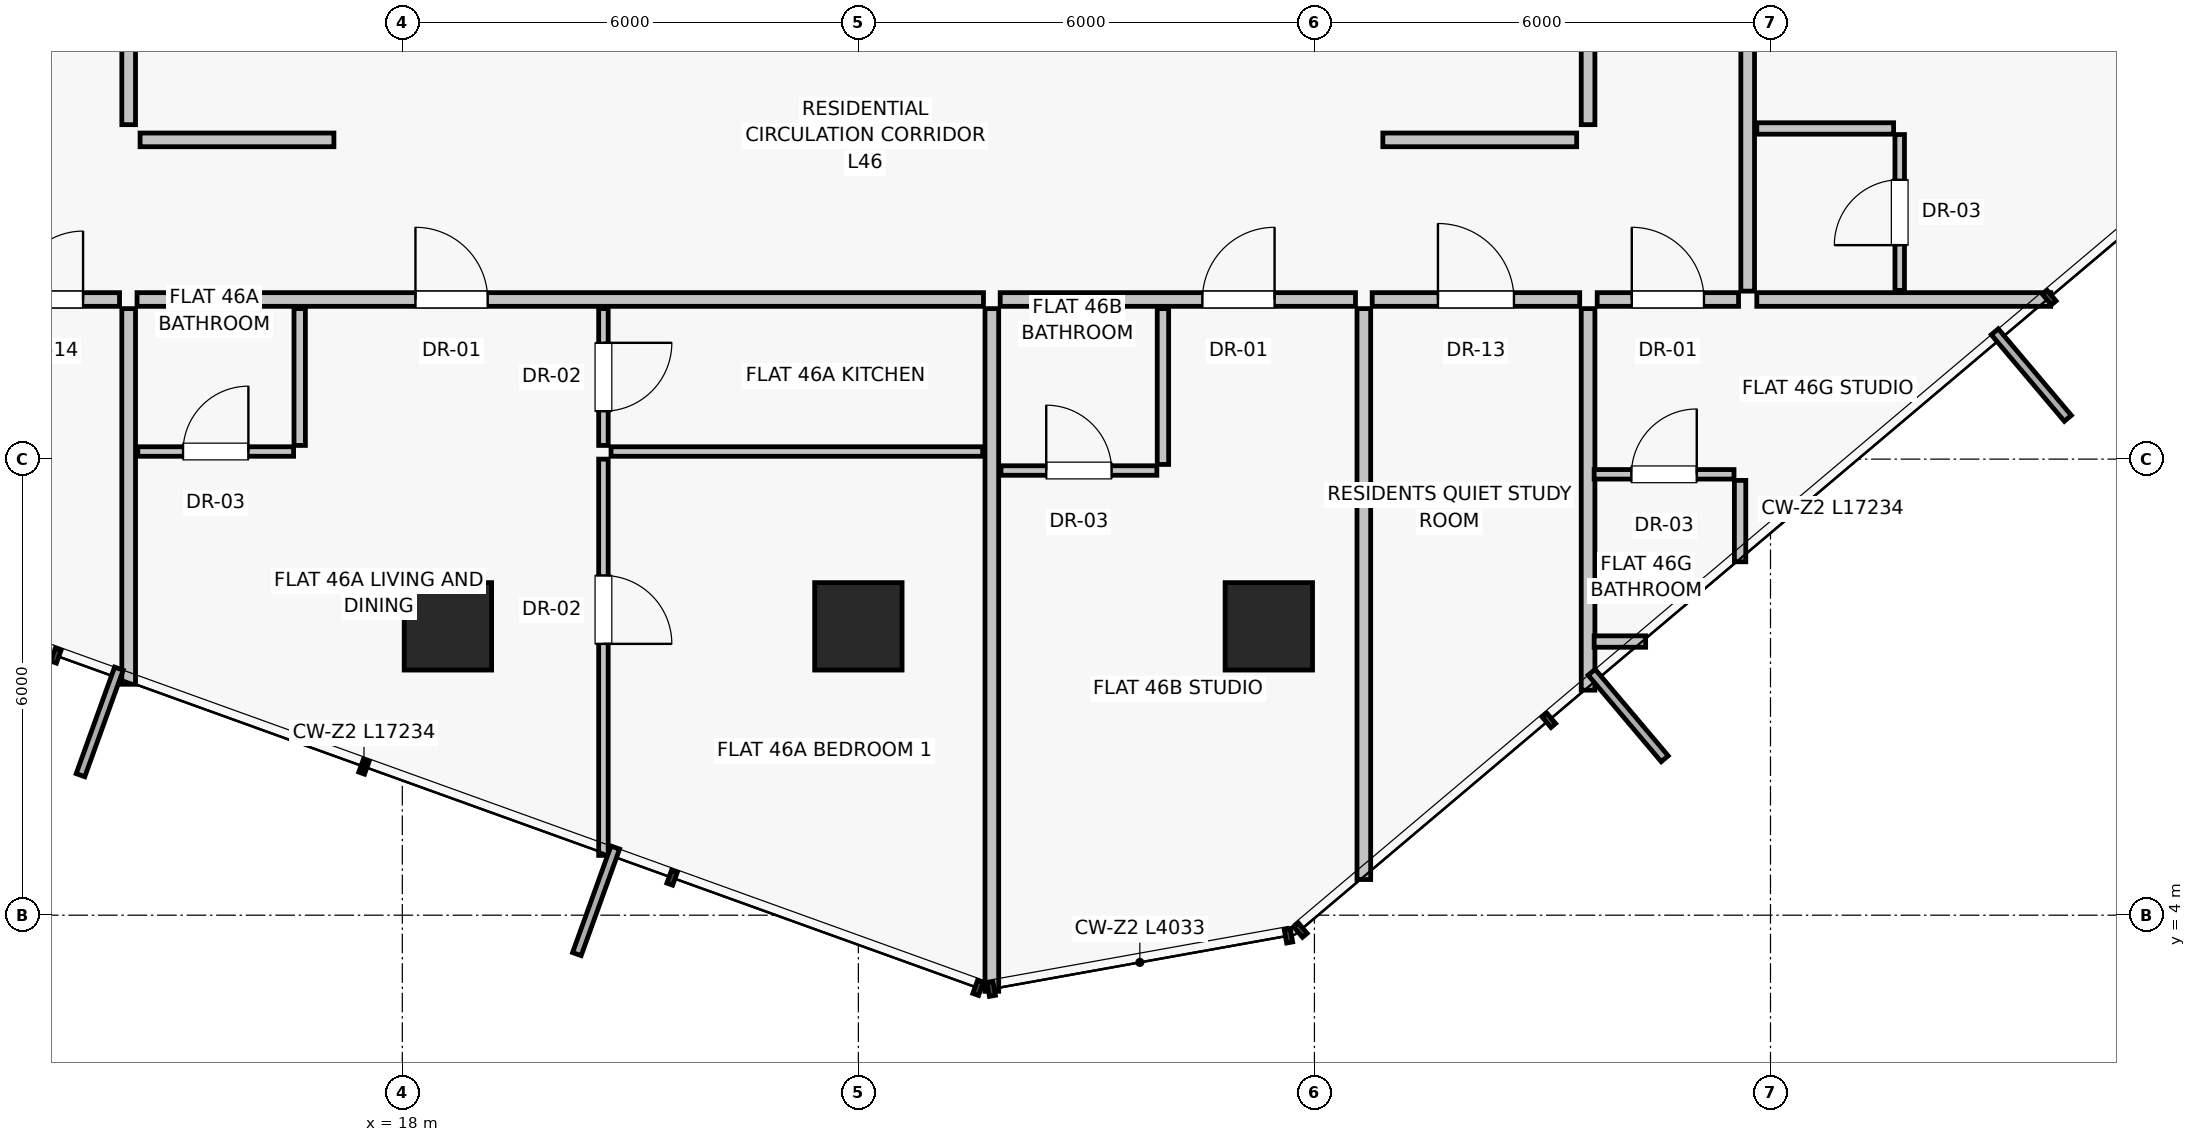
"""IFC4 building model, lengths in metres.
Left out: names, types, materials, properties, quantities, classifications, styles, units other than length and angle.
Written with IfcOpenShell. Run it as: python <this file> out.ifc"""

import sys

from ifc_helpers import new_model, si_unit, direction, frame, frame_2d, origin, origin_2d, place, context, subcontext, project, spatial, rectangle, extrude, source, transform, mapped, element, fill, save


model = new_model("IFC4")
c1 = context("Model", 3, precision=1e-05, world=origin(), true_north=direction((0.0, 1.0)))
c2 = subcontext(c1, "Body", "Model", "MODEL_VIEW")
j1 = project(units=[si_unit("LENGTHUNIT", "METRE"), si_unit("PLANEANGLEUNIT", "RADIAN")], contexts=[c1])
p1 = place(None, origin())
s1 = spatial("IfcSite", under=j1, at=p1, CompositionType="ELEMENT")
p2 = place(p1, origin())
s2 = spatial("IfcBuilding", under=s1, at=p2, CompositionType="ELEMENT")
p3 = place(p2, frame((0.0, 0.0, 163.05)))
s3 = spatial("IfcBuildingStorey", under=s2, at=p3, CompositionType="ELEMENT", Elevation=163.05)
for number, where, z_axis, x_axis in (
    (1, (18.6, 7.8, 0.0), (0.0, 0.0, 1.0), (1.0, 0.0, 0.0)),
    (2, (24.0, 7.8, 0.0), (0.0, 0.0, 1.0), (1.0, 0.0, 0.0)),
    (3, (29.4, 7.8, 0.0), (0.0, 0.0, 1.0), (1.0, 0.0, 0.0)),
):
    element("IfcColumn", number, at=place(p3, frame(where, z_axis=z_axis, x_axis=x_axis)), inside=s3, PredefinedType="COLUMN", context=c2, shape_type="SweptSolid", body=[
        extrude(rectangle(XDim=1.15, YDim=1.15, at=origin_2d()), origin(), (0.0, 0.0, 1.0), 3.25),
    ])
p4 = place(p3, frame((14.4, 14.4, 0.0), z_axis=(0.0, 0.0, 1.0), x_axis=(0.0, 1.0, 0.0)))
e4 = element("IfcWall", 4, at=p4, inside=s3, PredefinedType="PARTITIONING", context=c2, shape_type="SweptSolid", body=[
    extrude(rectangle(XDim=9.4, YDim=0.18, at=frame_2d((4.7, 0.0))), origin(), (0.0, 0.0, 1.0), 3.0),
])
p5 = place(p4, frame((3.8, 0.0, 0.0)))
e5 = element("IfcOpeningElement", 5, at=p5, cuts=e4, PredefinedType="OPENING", context=c2, shape_type="SweptSolid", body=[
    extrude(rectangle(XDim=0.9, YDim=2.01, at=frame_2d((0.45, 1.005))), frame((0.0, 0.1, 0.0), z_axis=(0.0, -1.0, 0.0), x_axis=(1.0, 0.0, 0.0)), (0.0, 0.0, 1.0), 0.2),
])
p6 = place(p3, frame((33.6, 14.4, 0.0), z_axis=(0.0, 0.0, 1.0), x_axis=(0.0, 1.0, 0.0)))
e6 = element("IfcWall", 6, at=p6, inside=s3, PredefinedType="PARTITIONING", context=c2, shape_type="SweptSolid", body=[
    extrude(rectangle(XDim=9.4, YDim=0.18, at=frame_2d((4.7, 0.0))), origin(), (0.0, 0.0, 1.0), 3.0),
])
p7 = place(p6, frame((3.8, 0.0, 0.0)))
e7 = element("IfcOpeningElement", 7, at=p7, cuts=e6, PredefinedType="OPENING", context=c2, shape_type="SweptSolid", body=[
    extrude(rectangle(XDim=0.9, YDim=2.01, at=frame_2d((0.45, 1.005))), frame((0.0, 0.1, 0.0), z_axis=(0.0, -1.0, 0.0), x_axis=(1.0, 0.0, 0.0)), (0.0, 0.0, 1.0), 0.2),
])
for number, where, z_axis, x_axis in (
    (8, (14.55, 14.2, 0.0), (0.0, 0.0, 1.0), (1.0, 0.0, 0.0)),
    (9, (30.9, 14.2, 0.0), (0.0, 0.0, 1.0), (1.0, 0.0, 0.0)),
):
    element("IfcWall", number, at=place(p3, frame(where, z_axis=z_axis, x_axis=x_axis)), inside=s3, PredefinedType="PARTITIONING", context=c2, shape_type="SweptSolid", body=[
        extrude(rectangle(XDim=2.55, YDim=0.18, at=frame_2d((1.275, 0.0))), origin(), (0.0, 0.0, 1.0), 3.0),
    ])
p8 = place(p3, frame((14.4, 11.98, 0.0), z_axis=(0.0, 0.0, 1.0), x_axis=(0.0, -1.0, 0.0)))
e10 = element("IfcWall", 10, at=p8, inside=s3, PredefinedType="PARTITIONING", context=c2, shape_type="SweptSolid", body=[
    extrude(rectangle(XDim=4.942, YDim=0.18, at=frame_2d((2.471, 0.0))), origin(), (0.0, 0.0, 1.0), 3.0),
])
p9 = place(p3, frame((33.6, 11.98, 0.0), z_axis=(0.0, 0.0, 1.0), x_axis=(0.0, -1.0, 0.0)))
e11 = element("IfcWall", 11, at=p9, inside=s3, PredefinedType="PARTITIONING", context=c2, shape_type="SweptSolid", body=[
    extrude(rectangle(XDim=5.02, YDim=0.18, at=frame_2d((2.51, 0.0))), origin(), (0.0, 0.0, 1.0), 3.0),
])
p10 = place(p3, frame((14.51, 12.1, 0.0), z_axis=(0.0, 0.0, 1.0), x_axis=(1.0, 0.0, 0.0)))
e12 = element("IfcWall", 12, at=p10, inside=s3, PredefinedType="PARTITIONING", context=c2, shape_type="SweptSolid", body=[
    extrude(rectangle(XDim=11.136, YDim=0.18, at=frame_2d((5.568, 0.0))), origin(), (0.0, 0.0, 1.0), 2.58),
])
p11 = place(p10, frame((3.663, 0.0, 0.0)))
e13 = element("IfcOpeningElement", 13, at=p11, cuts=e12, PredefinedType="OPENING", context=c2, shape_type="SweptSolid", body=[
    extrude(rectangle(XDim=0.95, YDim=2.02, at=frame_2d((0.475, 1.01))), frame((0.0, 0.1, 0.0), z_axis=(0.0, -1.0, 0.0), x_axis=(1.0, 0.0, 0.0)), (0.0, 0.0, 1.0), 0.2),
])
p12 = place(p3, frame((16.65, 11.98, 0.0), z_axis=(0.0, 0.0, 1.0), x_axis=(0.0, -1.0, 0.0)))
e14 = element("IfcWall", 14, at=p12, inside=s3, PredefinedType="PARTITIONING", context=c2, shape_type="SweptSolid", body=[
    extrude(rectangle(XDim=1.8, YDim=0.15, at=frame_2d((0.9, 0.0))), origin(), (0.0, 0.0, 1.0), 3.0),
])
p13 = place(p3, frame((14.52, 10.1, 0.0), z_axis=(0.0, 0.0, 1.0), x_axis=(1.0, 0.0, 0.0)))
e15 = element("IfcWall", 15, at=p13, inside=s3, PredefinedType="PARTITIONING", context=c2, shape_type="SweptSolid", body=[
    extrude(rectangle(XDim=2.05, YDim=0.125, at=frame_2d((1.025, 0.0))), origin(), (0.0, 0.0, 1.0), 3.0),
])
p14 = place(p13, frame((0.595, 0.0, 0.0)))
e16 = element("IfcOpeningElement", 16, at=p14, cuts=e15, PredefinedType="OPENING", context=c2, shape_type="SweptSolid", body=[
    extrude(rectangle(XDim=0.86, YDim=2.01, at=frame_2d((0.43, 1.005))), frame((0.0, 0.073, 0.0), z_axis=(0.0, -1.0, 0.0), x_axis=(1.0, 0.0, 0.0)), (0.0, 0.0, 1.0), 0.145),
])
p15 = place(p3, frame((20.646, 11.98, 0.0), z_axis=(0.0, 0.0, 1.0), x_axis=(0.0, -1.0, 0.0)))
e17 = element("IfcWall", 17, at=p15, inside=s3, PredefinedType="PARTITIONING", context=c2, shape_type="SweptSolid", body=[
    extrude(rectangle(XDim=1.8, YDim=0.125, at=frame_2d((0.9, 0.0))), origin(), (0.0, 0.0, 1.0), 3.0),
])
p16 = place(p15, frame((0.45, 0.0, 0.0)))
e18 = element("IfcOpeningElement", 18, at=p16, cuts=e17, PredefinedType="OPENING", context=c2, shape_type="SweptSolid", body=[
    extrude(rectangle(XDim=0.9, YDim=2.01, at=frame_2d((0.45, 1.005))), frame((0.0, 0.073, 0.0), z_axis=(0.0, -1.0, 0.0), x_axis=(1.0, 0.0, 0.0)), (0.0, 0.0, 1.0), 0.145),
])
p17 = place(p3, frame((20.746, 10.1, 0.0), z_axis=(0.0, 0.0, 1.0), x_axis=(1.0, 0.0, 0.0)))
e19 = element("IfcWall", 19, at=p17, inside=s3, PredefinedType="PARTITIONING", context=c2, shape_type="SweptSolid", body=[
    extrude(rectangle(XDim=4.89, YDim=0.125, at=frame_2d((2.445, 0.0))), origin(), (0.0, 0.0, 1.0), 3.0),
])
p18 = place(p3, frame((20.646, 10.0, 0.0), z_axis=(0.0, 0.0, 1.0), x_axis=(0.0, -1.0, 0.0)))
e20 = element("IfcWall", 20, at=p18, inside=s3, PredefinedType="PARTITIONING", context=c2, shape_type="SweptSolid", body=[
    extrude(rectangle(XDim=5.213, YDim=0.125, at=frame_2d((2.607, 0.0))), origin(), (0.0, 0.0, 1.0), 3.0),
])
p19 = place(p18, frame((1.531, 0.0, 0.0)))
e21 = element("IfcOpeningElement", 21, at=p19, cuts=e20, PredefinedType="OPENING", context=c2, shape_type="SweptSolid", body=[
    extrude(rectangle(XDim=0.9, YDim=2.01, at=frame_2d((0.45, 1.005))), frame((0.0, 0.073, 0.0), z_axis=(0.0, -1.0, 0.0), x_axis=(1.0, 0.0, 0.0)), (0.0, 0.0, 1.0), 0.145),
])
p20 = place(p3, frame((25.756, 11.98, 0.0), z_axis=(0.0, 0.0, 1.0), x_axis=(0.0, -1.0, 0.0)))
e22 = element("IfcWall", 22, at=p20, inside=s3, PredefinedType="PARTITIONING", context=c2, shape_type="SweptSolid", body=[
    extrude(rectangle(XDim=8.981, YDim=0.18, at=frame_2d((4.491, 0.0))), origin(), (0.0, 0.0, 1.0), 3.0),
])
p21 = place(p3, frame((30.76, 12.1, 0.0), z_axis=(0.0, 0.0, 1.0), x_axis=(1.0, 0.0, 0.0)))
e23 = element("IfcWall", 23, at=p21, inside=s3, PredefinedType="PARTITIONING", context=c2, shape_type="SweptSolid", body=[
    extrude(rectangle(XDim=2.73, YDim=0.18, at=frame_2d((1.365, 0.0))), origin(), (0.0, 0.0, 1.0), 3.0),
])
p22 = place(p21, frame((0.865, 0.0, 0.0)))
e24 = element("IfcOpeningElement", 24, at=p22, cuts=e23, PredefinedType="OPENING", context=c2, shape_type="SweptSolid", body=[
    extrude(rectangle(XDim=1.0, YDim=2.01, at=frame_2d((0.5, 1.005))), frame((0.0, 0.1, 0.0), z_axis=(0.0, -1.0, 0.0), x_axis=(1.0, 0.0, 0.0)), (0.0, 0.0, 1.0), 0.2),
])
p23 = place(p3, frame((30.65, 11.98, 0.0), z_axis=(0.0, 0.0, 1.0), x_axis=(0.0, -1.0, 0.0)))
e25 = element("IfcWall", 25, at=p23, inside=s3, PredefinedType="PARTITIONING", context=c2, shape_type="SweptSolid", body=[
    extrude(rectangle(XDim=7.511, YDim=0.18, at=frame_2d((3.755, 0.0))), origin(), (0.0, 0.0, 1.0), 3.0),
])
p24 = place(p3, frame((25.866, 12.1, 0.0), z_axis=(0.0, 0.0, 1.0), x_axis=(1.0, 0.0, 0.0)))
e26 = element("IfcWall", 26, at=p24, inside=s3, PredefinedType="PARTITIONING", context=c2, shape_type="SweptSolid", body=[
    extrude(rectangle(XDim=4.674, YDim=0.18, at=frame_2d((2.337, 0.0))), origin(), (0.0, 0.0, 1.0), 2.58),
])
p25 = place(p24, frame((2.66, 0.0, 0.0)))
e27 = element("IfcOpeningElement", 27, at=p25, cuts=e26, PredefinedType="OPENING", context=c2, shape_type="SweptSolid", body=[
    extrude(rectangle(XDim=0.95, YDim=2.02, at=frame_2d((0.475, 1.01))), frame((0.0, 0.1, 0.0), z_axis=(0.0, -1.0, 0.0), x_axis=(1.0, 0.0, 0.0)), (0.0, 0.0, 1.0), 0.2),
])
p26 = place(p3, frame((28.007, 11.98, 0.0), z_axis=(0.0, 0.0, 1.0), x_axis=(0.0, -1.0, 0.0)))
e28 = element("IfcWall", 28, at=p26, inside=s3, PredefinedType="PARTITIONING", context=c2, shape_type="SweptSolid", body=[
    extrude(rectangle(XDim=2.05, YDim=0.15, at=frame_2d((1.025, 0.0))), origin(), (0.0, 0.0, 1.0), 3.0),
])
p27 = place(p3, frame((25.876, 9.85, 0.0), z_axis=(0.0, 0.0, 1.0), x_axis=(1.0, 0.0, 0.0)))
e29 = element("IfcWall", 29, at=p27, inside=s3, PredefinedType="PARTITIONING", context=c2, shape_type="SweptSolid", body=[
    extrude(rectangle(XDim=2.051, YDim=0.125, at=frame_2d((1.025, 0.0))), origin(), (0.0, 0.0, 1.0), 3.0),
])
p28 = place(p27, frame((0.595, 0.0, 0.0)))
e30 = element("IfcOpeningElement", 30, at=p28, cuts=e29, PredefinedType="OPENING", context=c2, shape_type="SweptSolid", body=[
    extrude(rectangle(XDim=0.86, YDim=2.01, at=frame_2d((0.43, 1.005))), frame((0.0, 0.073, 0.0), z_axis=(0.0, -1.0, 0.0), x_axis=(1.0, 0.0, 0.0)), (0.0, 0.0, 1.0), 0.145),
])
p29 = place(p3, frame((35.82, 12.1, 0.0), z_axis=(0.0, 0.0, 1.0), x_axis=(1.0, 0.0, 0.0)))
e31 = element("IfcWall", 31, at=p29, inside=s3, PredefinedType="PARTITIONING", context=c2, shape_type="SweptSolid", body=[
    extrude(rectangle(XDim=3.866, YDim=0.18, at=frame_2d((1.933, 0.0))), origin(), (0.0, 0.0, 1.0), 3.0),
])
p30 = place(p3, frame((35.7, 12.21, 0.0), z_axis=(0.0, 0.0, 1.0), x_axis=(0.0, 1.0, 0.0)))
e32 = element("IfcWall", 32, at=p30, inside=s3, PredefinedType="PARTITIONING", context=c2, shape_type="SweptSolid", body=[
    extrude(rectangle(XDim=13.782, YDim=0.18, at=frame_2d((6.891, 0.0))), origin(), (0.0, 0.0, 1.0), 2.58),
])
p31 = place(p30, frame((4.46, 0.0, 0.0)))
e33 = element("IfcOpeningElement", 33, at=p31, cuts=e32, PredefinedType="OPENING", context=c2, shape_type="SweptSolid", body=[
    extrude(rectangle(XDim=0.95, YDim=2.02, at=frame_2d((0.475, 1.01))), frame((0.0, 0.1, 0.0), z_axis=(0.0, -1.0, 0.0), x_axis=(1.0, 0.0, 0.0)), (0.0, 0.0, 1.0), 0.2),
])
p32 = place(p3, frame((35.82, 14.35, 0.0), z_axis=(0.0, 0.0, 1.0), x_axis=(1.0, 0.0, 0.0)))
e34 = element("IfcWall", 34, at=p32, inside=s3, PredefinedType="PARTITIONING", context=c2, shape_type="SweptSolid", body=[
    extrude(rectangle(XDim=1.8, YDim=0.15, at=frame_2d((0.9, 0.0))), origin(), (0.0, 0.0, 1.0), 3.0),
])
p33 = place(p3, frame((37.7, 12.22, 0.0), z_axis=(0.0, 0.0, 1.0), x_axis=(0.0, 1.0, 0.0)))
e35 = element("IfcWall", 35, at=p33, inside=s3, PredefinedType="PARTITIONING", context=c2, shape_type="SweptSolid", body=[
    extrude(rectangle(XDim=2.05, YDim=0.125, at=frame_2d((1.025, 0.0))), origin(), (0.0, 0.0, 1.0), 3.0),
])
p34 = place(p33, frame((0.595, 0.0, 0.0)))
e36 = element("IfcOpeningElement", 36, at=p34, cuts=e35, PredefinedType="OPENING", context=c2, shape_type="SweptSolid", body=[
    extrude(rectangle(XDim=0.86, YDim=2.01, at=frame_2d((0.43, 1.005))), frame((0.0, 0.073, 0.0), z_axis=(0.0, -1.0, 0.0), x_axis=(1.0, 0.0, 0.0)), (0.0, 0.0, 1.0), 0.145),
])
p35 = place(p3, frame((12.42, 12.1, 0.0), z_axis=(0.0, 0.0, 1.0), x_axis=(1.0, 0.0, 0.0)))
e37 = element("IfcWall", 37, at=p35, inside=s3, PredefinedType="PARTITIONING", context=c2, shape_type="SweptSolid", body=[
    extrude(rectangle(XDim=1.86, YDim=0.18, at=frame_2d((0.93, 0.0))), origin(), (0.0, 0.0, 1.0), 3.0),
])
p36 = place(p35, frame((0.48, 0.0, 0.0)))
e38 = element("IfcOpeningElement", 38, at=p36, cuts=e37, PredefinedType="OPENING", context=c2, shape_type="SweptSolid", body=[
    extrude(rectangle(XDim=0.9, YDim=2.01, at=frame_2d((0.45, 1.005))), frame((0.0, 0.1, 0.0), z_axis=(0.0, -1.0, 0.0), x_axis=(1.0, 0.0, 0.0)), (0.0, 0.0, 1.0), 0.2),
])
p37 = place(p3, frame((33.72, 12.1, 0.0), z_axis=(0.0, 0.0, 1.0), x_axis=(1.0, 0.0, 0.0)))
e39 = element("IfcWall", 39, at=p37, inside=s3, PredefinedType="PARTITIONING", context=c2, shape_type="SweptSolid", body=[
    extrude(rectangle(XDim=1.86, YDim=0.18, at=frame_2d((0.93, 0.0))), origin(), (0.0, 0.0, 1.0), 3.0),
])
p38 = place(p37, frame((0.455, 0.0, 0.0)))
e40 = element("IfcOpeningElement", 40, at=p38, cuts=e39, PredefinedType="OPENING", context=c2, shape_type="SweptSolid", body=[
    extrude(rectangle(XDim=0.95, YDim=2.02, at=frame_2d((0.475, 1.01))), frame((0.0, 0.1, 0.0), z_axis=(0.0, -1.0, 0.0), x_axis=(1.0, 0.0, 0.0)), (0.0, 0.0, 1.0), 0.2),
])
p39 = place(p3, frame((33.68, 9.8, 0.0), z_axis=(0.0, 0.0, 1.0), x_axis=(1.0, 0.0, 0.0)))
e41 = element("IfcWall", 41, at=p39, inside=s3, PredefinedType="PARTITIONING", context=c2, shape_type="SweptSolid", body=[
    extrude(rectangle(XDim=1.84, YDim=0.125, at=frame_2d((0.92, 0.0))), origin(), (0.0, 0.0, 1.0), 3.0),
])
p40 = place(p39, frame((0.49, 0.0, 0.0)))
e42 = element("IfcOpeningElement", 42, at=p40, cuts=e41, PredefinedType="OPENING", context=c2, shape_type="SweptSolid", body=[
    extrude(rectangle(XDim=0.86, YDim=2.01, at=frame_2d((0.43, 1.005))), frame((0.0, 0.073, 0.0), z_axis=(0.0, -1.0, 0.0), x_axis=(1.0, 0.0, 0.0)), (0.0, 0.0, 1.0), 0.145),
])
p41 = place(p3, frame((33.68, 7.6, 0.0), z_axis=(0.0, 0.0, 1.0), x_axis=(1.0, 0.0, 0.0)))
e43 = element("IfcWall", 43, at=p41, inside=s3, PredefinedType="PARTITIONING", context=c2, shape_type="SweptSolid", body=[
    extrude(rectangle(XDim=0.677, YDim=0.15, at=frame_2d((0.339, 0.0))), origin(), (0.0, 0.0, 1.0), 3.0),
])
p42 = place(p3, frame((35.6, 8.649, 0.0), z_axis=(0.0, 0.0, 1.0), x_axis=(0.0, 1.0, 0.0)))
e44 = element("IfcWall", 44, at=p42, inside=s3, PredefinedType="PARTITIONING", context=c2, shape_type="SweptSolid", body=[
    extrude(rectangle(XDim=1.071, YDim=0.15, at=frame_2d((0.535, 0.0))), origin(), (0.0, 0.0, 1.0), 3.0),
])
m1 = source(origin(), c2, "Body", "SweptSolid", [
    extrude(rectangle(XDim=0.95, YDim=2.02, at=frame_2d((0.475, 1.01))), frame((0.0, 0.025, 0.0), z_axis=(0.0, -1.0, 0.0), x_axis=(1.0, 0.0, 0.0)), (0.0, 0.0, 1.0), 0.05),
])
p43 = place(p11, origin())
e45 = element("IfcDoor", 45, at=p43, inside=s3, OperationType="SINGLE_SWING_LEFT", PredefinedType="DOOR", context=c2, shape_type="MappedRepresentation", body=[
    mapped(m1, transform((0.0, 0.0, 0.0), scale=1.0)),
])
fill(e13, e45)
m2 = source(origin(), c2, "Body", "SweptSolid", [
    extrude(rectangle(XDim=0.86, YDim=2.01, at=frame_2d((0.43, 1.005))), frame((0.0, 0.025, 0.0), z_axis=(0.0, -1.0, 0.0), x_axis=(1.0, 0.0, 0.0)), (0.0, 0.0, 1.0), 0.05),
])
p44 = place(p14, origin())
e46 = element("IfcDoor", 46, at=p44, inside=s3, OperationType="SINGLE_SWING_RIGHT", PredefinedType="DOOR", context=c2, shape_type="MappedRepresentation", body=[
    mapped(m2, transform((0.0, 0.0, 0.0), scale=1.0)),
])
fill(e16, e46)
m3 = source(origin(), c2, "Body", "SweptSolid", [
    extrude(rectangle(XDim=0.9, YDim=2.01, at=frame_2d((0.45, 1.005))), frame((0.0, 0.025, 0.0), z_axis=(0.0, -1.0, 0.0), x_axis=(1.0, 0.0, 0.0)), (0.0, 0.0, 1.0), 0.05),
])
p45 = place(p16, origin())
e47 = element("IfcDoor", 47, at=p45, inside=s3, OperationType="SINGLE_SWING_LEFT", PredefinedType="DOOR", context=c2, shape_type="MappedRepresentation", body=[
    mapped(m3, transform((0.0, 0.0, 0.0), scale=1.0)),
])
fill(e18, e47)
p46 = place(p19, origin())
e48 = element("IfcDoor", 48, at=p46, inside=s3, OperationType="SINGLE_SWING_RIGHT", PredefinedType="DOOR", context=c2, shape_type="MappedRepresentation", body=[
    mapped(m3, transform((0.0, 0.0, 0.0), scale=1.0)),
])
fill(e21, e48)
m4 = source(origin(), c2, "Body", "SweptSolid", [
    extrude(rectangle(XDim=1.0, YDim=2.01, at=frame_2d((0.5, 1.005))), frame((0.0, 0.025, 0.0), z_axis=(0.0, -1.0, 0.0), x_axis=(1.0, 0.0, 0.0)), (0.0, 0.0, 1.0), 0.05),
])
p47 = place(p22, origin())
e49 = element("IfcDoor", 49, at=p47, inside=s3, OperationType="SINGLE_SWING_LEFT", PredefinedType="DOOR", context=c2, shape_type="MappedRepresentation", body=[
    mapped(m4, transform((0.0, 0.0, 0.0), scale=1.0)),
])
fill(e24, e49)
p48 = place(p25, origin())
e50 = element("IfcDoor", 50, at=p48, inside=s3, OperationType="SINGLE_SWING_RIGHT", PredefinedType="DOOR", context=c2, shape_type="MappedRepresentation", body=[
    mapped(m1, transform((0.0, 0.0, 0.0), scale=1.0)),
])
fill(e27, e50)
p49 = place(p28, origin())
e51 = element("IfcDoor", 51, at=p49, inside=s3, OperationType="SINGLE_SWING_LEFT", PredefinedType="DOOR", context=c2, shape_type="MappedRepresentation", body=[
    mapped(m2, transform((0.0, 0.0, 0.0), scale=1.0)),
])
fill(e30, e51)
p50 = place(p34, origin())
e52 = element("IfcDoor", 52, at=p50, inside=s3, OperationType="SINGLE_SWING_LEFT", PredefinedType="DOOR", context=c2, shape_type="MappedRepresentation", body=[
    mapped(m2, transform((0.0, 0.0, 0.0), scale=1.0)),
])
fill(e36, e52)
p51 = place(p36, origin())
e53 = element("IfcDoor", 53, at=p51, inside=s3, OperationType="SINGLE_SWING_RIGHT", PredefinedType="DOOR", context=c2, shape_type="MappedRepresentation", body=[
    mapped(m3, transform((0.0, 0.0, 0.0), scale=1.0)),
])
fill(e38, e53)
p52 = place(p38, origin())
e54 = element("IfcDoor", 54, at=p52, inside=s3, OperationType="SINGLE_SWING_LEFT", PredefinedType="DOOR", context=c2, shape_type="MappedRepresentation", body=[
    mapped(m1, transform((0.0, 0.0, 0.0), scale=1.0)),
])
fill(e40, e54)
p53 = place(p40, origin())
e55 = element("IfcDoor", 55, at=p53, inside=s3, OperationType="SINGLE_SWING_RIGHT", PredefinedType="DOOR", context=c2, shape_type="MappedRepresentation", body=[
    mapped(m2, transform((0.0, 0.0, 0.0), scale=1.0)),
])
fill(e42, e55)
save(model, sys.argv[1])
